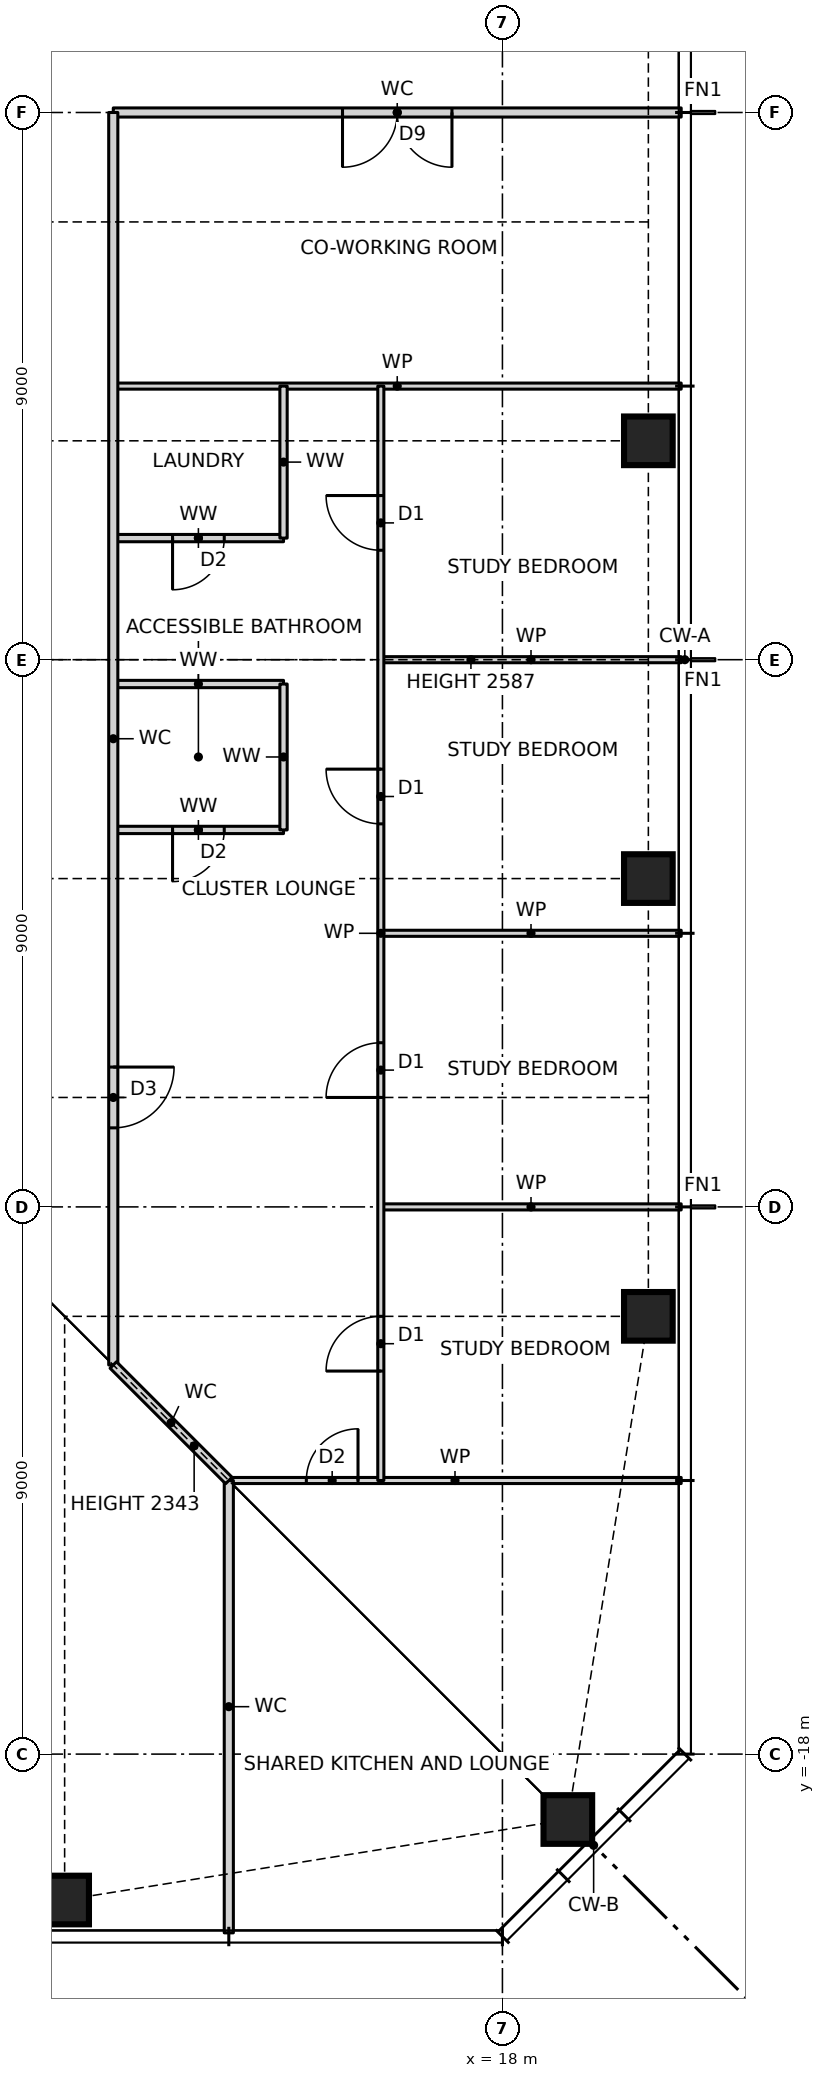
"""IFC4 building model, lengths in metres.
Left out: names, types, materials, properties, quantities, classifications, styles, units other than length and angle.
Written with IfcOpenShell. Run it as: python <this file> out.ifc"""

import sys

from ifc_helpers import new_model, si_unit, direction, frame, frame_2d, origin, origin_2d, place, context, subcontext, project, spatial, rectangle, hollow_rectangle, extrude, element, fill, save


model = new_model("IFC4")
c1 = context("Model", 3, precision=1e-05, world=origin(), true_north=direction((0.0, 1.0)))
c2 = subcontext(c1, "Body", "Model", "MODEL_VIEW")
j1 = project(units=[si_unit("LENGTHUNIT", "METRE"), si_unit("PLANEANGLEUNIT", "RADIAN")], contexts=[c1])
p1 = place(None, origin())
s1 = spatial("IfcSite", under=j1, at=p1, CompositionType="ELEMENT")
p2 = place(p1, origin())
s2 = spatial("IfcBuilding", under=s1, at=p2, CompositionType="ELEMENT")
p3 = place(p2, frame((0.0, 0.0, 122.5)))
s3 = spatial("IfcBuildingStorey", under=s2, at=p3, CompositionType="ELEMENT", Elevation=122.5)
for number, where, z_axis, x_axis in (
    (1, (10.8, -20.4, 0.0), (0.0, 0.0, 1.0), (1.0, 0.0, 0.0)),
    (2, (19.076, -19.076, 0.0), (0.0, 0.0, 1.0), (1.0, 0.0, 0.0)),
    (3, (20.4, -10.8, 0.0), (0.0, 0.0, 1.0), (1.0, 0.0, 0.0)),
    (4, (20.4, -3.6, 0.0), (0.0, 0.0, 1.0), (1.0, 0.0, 0.0)),
    (5, (20.4, 3.6, 0.0), (0.0, 0.0, 1.0), (1.0, 0.0, 0.0)),
):
    element("IfcColumn", number, at=place(p3, frame(where, z_axis=z_axis, x_axis=x_axis)), inside=s3, PredefinedType="COLUMN", context=c2, shape_type="SweptSolid", body=[
        extrude(hollow_rectangle(XDim=0.8, YDim=0.8, WallThickness=0.07, at=origin_2d()), origin(), (0.0, 0.0, 1.0), 3.5),
    ])
p4 = place(p3, frame((13.5, -13.5, 0.0), z_axis=(0.0, 0.0, 1.0), x_axis=(1.0, 0.0, 0.0)))
e6 = element("IfcWall", 6, at=p4, inside=s3, PredefinedType="PARTITIONING", context=c2, shape_type="SweptSolid", body=[
    extrude(rectangle(XDim=7.44, YDim=0.1, at=frame_2d((3.72, 0.0))), origin(), (0.0, 0.0, 1.0), 3.27),
])
p5 = place(p4, frame((1.275, 0.0, 0.0)))
e7 = element("IfcOpeningElement", 7, at=p5, cuts=e6, PredefinedType="OPENING", context=c2, shape_type="SweptSolid", body=[
    extrude(rectangle(XDim=0.85, YDim=2.1, at=frame_2d((0.425, 1.05))), frame((0.0, 0.06, 0.0), z_axis=(0.0, -1.0, 0.0), x_axis=(1.0, 0.0, 0.0)), (0.0, 0.0, 1.0), 0.12),
])
for number, where, z_axis, x_axis in (
    (8, (16.0, -9.0, 0.0), (0.0, 0.0, 1.0), (1.0, 0.0, 0.0)),
    (9, (16.0, -4.5, 0.0), (0.0, 0.0, 1.0), (1.0, 0.0, 0.0)),
):
    element("IfcWall", number, at=place(p3, frame(where, z_axis=z_axis, x_axis=x_axis)), inside=s3, PredefinedType="PARTITIONING", context=c2, shape_type="SweptSolid", body=[
        extrude(rectangle(XDim=4.94, YDim=0.1, at=frame_2d((2.47, 0.0))), origin(), (0.0, 0.0, 1.0), 3.27),
    ])
p6 = place(p3, frame((11.6, -2.8, 0.0), z_axis=(0.0, 0.0, 1.0), x_axis=(1.0, 0.0, 0.0)))
e10 = element("IfcWall", 10, at=p6, inside=s3, PredefinedType="PARTITIONING", context=c2, shape_type="SweptSolid", body=[
    extrude(rectangle(XDim=2.8, YDim=0.12, at=frame_2d((1.4, 0.0))), origin(), (0.0, 0.0, 1.0), 3.27),
])
p7 = place(p6, frame((0.975, 0.0, 0.0)))
e11 = element("IfcOpeningElement", 11, at=p7, cuts=e10, PredefinedType="OPENING", context=c2, shape_type="SweptSolid", body=[
    extrude(rectangle(XDim=0.85, YDim=2.1, at=frame_2d((0.425, 1.05))), frame((0.0, 0.07, 0.0), z_axis=(0.0, -1.0, 0.0), x_axis=(1.0, 0.0, 0.0)), (0.0, 0.0, 1.0), 0.14),
])
p8 = place(p3, frame((11.6, -0.4, 0.0), z_axis=(0.0, 0.0, 1.0), x_axis=(1.0, 0.0, 0.0)))
e12 = element("IfcWall", 12, at=p8, inside=s3, PredefinedType="PARTITIONING", context=c2, shape_type="SweptSolid", body=[
    extrude(rectangle(XDim=2.8, YDim=0.12, at=frame_2d((1.4, 0.0))), origin(), (0.0, 0.0, 1.0), 3.27),
])
p9 = place(p3, frame((16.0, 0.0, 0.0), z_axis=(0.0, 0.0, 1.0), x_axis=(1.0, 0.0, 0.0)))
e13 = element("IfcWall", 13, at=p9, inside=s3, PredefinedType="PARTITIONING", context=c2, shape_type="SweptSolid", body=[
    extrude(rectangle(XDim=4.94, YDim=0.1, at=frame_2d((2.47, 0.0))), origin(), (0.0, 0.0, 1.0), 2.587),
])
p10 = place(p3, frame((11.6, 2.0, 0.0), z_axis=(0.0, 0.0, 1.0), x_axis=(1.0, 0.0, 0.0)))
e14 = element("IfcWall", 14, at=p10, inside=s3, PredefinedType="PARTITIONING", context=c2, shape_type="SweptSolid", body=[
    extrude(rectangle(XDim=2.8, YDim=0.12, at=frame_2d((1.4, 0.0))), origin(), (0.0, 0.0, 1.0), 3.27),
])
p11 = place(p10, frame((0.975, 0.0, 0.0)))
e15 = element("IfcOpeningElement", 15, at=p11, cuts=e14, PredefinedType="OPENING", context=c2, shape_type="SweptSolid", body=[
    extrude(rectangle(XDim=0.85, YDim=2.1, at=frame_2d((0.425, 1.05))), frame((0.0, 0.07, 0.0), z_axis=(0.0, -1.0, 0.0), x_axis=(1.0, 0.0, 0.0)), (0.0, 0.0, 1.0), 0.14),
])
p12 = place(p3, frame((11.6, 4.5, 0.0), z_axis=(0.0, 0.0, 1.0), x_axis=(1.0, 0.0, 0.0)))
e16 = element("IfcWall", 16, at=p12, inside=s3, PredefinedType="PARTITIONING", context=c2, shape_type="SweptSolid", body=[
    extrude(rectangle(XDim=9.34, YDim=0.1, at=frame_2d((4.67, 0.0))), origin(), (0.0, 0.0, 1.0), 3.27),
])
p13 = place(p3, frame((11.6, 9.0, 0.0), z_axis=(0.0, 0.0, 1.0), x_axis=(1.0, 0.0, 0.0)))
e17 = element("IfcWall", 17, at=p13, inside=s3, PredefinedType="PARTITIONING", context=c2, shape_type="SweptSolid", body=[
    extrude(rectangle(XDim=9.34, YDim=0.15, at=frame_2d((4.67, 0.0))), origin(), (0.0, 0.0, 1.0), 3.27),
])
p14 = place(p13, frame((3.77, 0.0, 0.0)))
e18 = element("IfcOpeningElement", 18, at=p14, cuts=e17, PredefinedType="OPENING", context=c2, shape_type="SweptSolid", body=[
    extrude(rectangle(XDim=1.8, YDim=2.1, at=frame_2d((0.9, 1.05))), frame((0.0, 0.085, 0.0), z_axis=(0.0, -1.0, 0.0), x_axis=(1.0, 0.0, 0.0)), (0.0, 0.0, 1.0), 0.17),
])
p15 = place(p3, frame((16.0, -13.5, 0.0), z_axis=(0.0, 0.0, 1.0), x_axis=(0.0, 1.0, 0.0)))
e19 = element("IfcWall", 19, at=p15, inside=s3, PredefinedType="PARTITIONING", context=c2, shape_type="SweptSolid", body=[
    extrude(rectangle(XDim=18.0, YDim=0.1, at=frame_2d((9.0, 0.0))), origin(), (0.0, 0.0, 1.0), 3.27),
])
p16 = place(p15, frame((1.8, 0.0, 0.0)))
e20 = element("IfcOpeningElement", 20, at=p16, cuts=e19, PredefinedType="OPENING", context=c2, shape_type="SweptSolid", body=[
    extrude(rectangle(XDim=0.9, YDim=2.1, at=frame_2d((0.45, 1.05))), frame((0.0, 0.06, 0.0), z_axis=(0.0, -1.0, 0.0), x_axis=(1.0, 0.0, 0.0)), (0.0, 0.0, 1.0), 0.12),
])
p17 = place(p15, frame((6.3, 0.0, 0.0)))
e21 = element("IfcOpeningElement", 21, at=p17, cuts=e19, PredefinedType="OPENING", context=c2, shape_type="SweptSolid", body=[
    extrude(rectangle(XDim=0.9, YDim=2.1, at=frame_2d((0.45, 1.05))), frame((0.0, 0.06, 0.0), z_axis=(0.0, -1.0, 0.0), x_axis=(1.0, 0.0, 0.0)), (0.0, 0.0, 1.0), 0.12),
])
p18 = place(p15, frame((10.8, 0.0, 0.0)))
e22 = element("IfcOpeningElement", 22, at=p18, cuts=e19, PredefinedType="OPENING", context=c2, shape_type="SweptSolid", body=[
    extrude(rectangle(XDim=0.9, YDim=2.1, at=frame_2d((0.45, 1.05))), frame((0.0, 0.06, 0.0), z_axis=(0.0, -1.0, 0.0), x_axis=(1.0, 0.0, 0.0)), (0.0, 0.0, 1.0), 0.12),
])
p19 = place(p15, frame((15.3, 0.0, 0.0)))
e23 = element("IfcOpeningElement", 23, at=p19, cuts=e19, PredefinedType="OPENING", context=c2, shape_type="SweptSolid", body=[
    extrude(rectangle(XDim=0.9, YDim=2.1, at=frame_2d((0.45, 1.05))), frame((0.0, 0.06, 0.0), z_axis=(0.0, -1.0, 0.0), x_axis=(1.0, 0.0, 0.0)), (0.0, 0.0, 1.0), 0.12),
])
p20 = place(p3, frame((14.4, -2.8, 0.0), z_axis=(0.0, 0.0, 1.0), x_axis=(0.0, 1.0, 0.0)))
e24 = element("IfcWall", 24, at=p20, inside=s3, PredefinedType="PARTITIONING", context=c2, shape_type="SweptSolid", body=[
    extrude(rectangle(XDim=2.4, YDim=0.12, at=frame_2d((1.2, 0.0))), origin(), (0.0, 0.0, 1.0), 3.27),
])
p21 = place(p3, frame((14.4, 2.0, 0.0), z_axis=(0.0, 0.0, 1.0), x_axis=(0.0, 1.0, 0.0)))
e25 = element("IfcWall", 25, at=p21, inside=s3, PredefinedType="PARTITIONING", context=c2, shape_type="SweptSolid", body=[
    extrude(rectangle(XDim=2.5, YDim=0.12, at=frame_2d((1.25, 0.0))), origin(), (0.0, 0.0, 1.0), 3.27),
])
p22 = place(p3, frame((13.5, -20.94, 0.0), z_axis=(0.0, 0.0, 1.0), x_axis=(0.0, 1.0, 0.0)))
e26 = element("IfcWall", 26, at=p22, inside=s3, PredefinedType="PARTITIONING", context=c2, shape_type="SweptSolid", body=[
    extrude(rectangle(XDim=7.44, YDim=0.15, at=frame_2d((3.72, 0.0))), origin(), (0.0, 0.0, 1.0), 3.27),
])
p23 = place(p3, frame((11.6, -11.6, 0.0), z_axis=(0.0, 0.0, 1.0), x_axis=(0.0, 1.0, 0.0)))
e27 = element("IfcWall", 27, at=p23, inside=s3, PredefinedType="PARTITIONING", context=c2, shape_type="SweptSolid", body=[
    extrude(rectangle(XDim=20.6, YDim=0.15, at=frame_2d((10.3, 0.0))), origin(), (0.0, 0.0, 1.0), 3.27),
])
p24 = place(p23, frame((3.9, 0.0, 0.0)))
e28 = element("IfcOpeningElement", 28, at=p24, cuts=e27, PredefinedType="OPENING", context=c2, shape_type="SweptSolid", body=[
    extrude(rectangle(XDim=1.0, YDim=2.1, at=frame_2d((0.5, 1.05))), frame((0.0, 0.085, 0.0), z_axis=(0.0, -1.0, 0.0), x_axis=(1.0, 0.0, 0.0)), (0.0, 0.0, 1.0), 0.17),
])
p25 = place(p3, frame((13.5, -13.5, 0.0), z_axis=(0.0, 0.0, 1.0), x_axis=(-0.707106781187, 0.707106781187, 0.0)))
e29 = element("IfcWall", 29, at=p25, inside=s3, PredefinedType="PARTITIONING", context=c2, shape_type="SweptSolid", body=[
    extrude(rectangle(XDim=2.687, YDim=0.15, at=frame_2d((1.343, 0.0))), origin(), (0.0, 0.0, 1.0), 2.343),
])
p26 = place(p16, origin())
e30 = element("IfcDoor", 30, at=p26, inside=s3, OperationType="SINGLE_SWING_LEFT", PredefinedType="DOOR", context=c2, shape_type="SweptSolid", body=[
    extrude(rectangle(XDim=0.9, YDim=2.1, at=frame_2d((0.45, 1.05))), frame((0.0, 0.025, 0.0), z_axis=(0.0, -1.0, 0.0), x_axis=(1.0, 0.0, 0.0)), (0.0, 0.0, 1.0), 0.05),
])
fill(e20, e30)
p27 = place(p17, origin())
e31 = element("IfcDoor", 31, at=p27, inside=s3, OperationType="SINGLE_SWING_LEFT", PredefinedType="DOOR", context=c2, shape_type="SweptSolid", body=[
    extrude(rectangle(XDim=0.9, YDim=2.1, at=frame_2d((0.45, 1.05))), frame((0.0, 0.025, 0.0), z_axis=(0.0, -1.0, 0.0), x_axis=(1.0, 0.0, 0.0)), (0.0, 0.0, 1.0), 0.05),
])
fill(e21, e31)
p28 = place(p18, origin())
e32 = element("IfcDoor", 32, at=p28, inside=s3, OperationType="SINGLE_SWING_RIGHT", PredefinedType="DOOR", context=c2, shape_type="SweptSolid", body=[
    extrude(rectangle(XDim=0.9, YDim=2.1, at=frame_2d((0.45, 1.05))), frame((0.0, 0.025, 0.0), z_axis=(0.0, -1.0, 0.0), x_axis=(1.0, 0.0, 0.0)), (0.0, 0.0, 1.0), 0.05),
])
fill(e22, e32)
p29 = place(p19, origin())
e33 = element("IfcDoor", 33, at=p29, inside=s3, OperationType="SINGLE_SWING_RIGHT", PredefinedType="DOOR", context=c2, shape_type="SweptSolid", body=[
    extrude(rectangle(XDim=0.9, YDim=2.1, at=frame_2d((0.45, 1.05))), frame((0.0, 0.025, 0.0), z_axis=(0.0, -1.0, 0.0), x_axis=(1.0, 0.0, 0.0)), (0.0, 0.0, 1.0), 0.05),
])
fill(e23, e33)
p30 = place(p24, frame((1.0, 0.0, 0.0), z_axis=(0.0, 0.0, 1.0), x_axis=(-1.0, 0.0, 0.0)))
e34 = element("IfcDoor", 34, at=p30, inside=s3, OperationType="SINGLE_SWING_LEFT", PredefinedType="DOOR", context=c2, shape_type="SweptSolid", body=[
    extrude(rectangle(XDim=1.0, YDim=2.1, at=frame_2d((0.5, 1.05))), frame((0.0, 0.025, 0.0), z_axis=(0.0, -1.0, 0.0), x_axis=(1.0, 0.0, 0.0)), (0.0, 0.0, 1.0), 0.05),
])
fill(e28, e34)
p31 = place(p7, frame((0.85, 0.0, 0.0), z_axis=(0.0, 0.0, 1.0), x_axis=(-1.0, 0.0, 0.0)))
e35 = element("IfcDoor", 35, at=p31, inside=s3, OperationType="SINGLE_SWING_RIGHT", PredefinedType="DOOR", context=c2, shape_type="SweptSolid", body=[
    extrude(rectangle(XDim=0.85, YDim=2.1, at=frame_2d((0.425, 1.05))), frame((0.0, 0.025, 0.0), z_axis=(0.0, -1.0, 0.0), x_axis=(1.0, 0.0, 0.0)), (0.0, 0.0, 1.0), 0.05),
])
fill(e11, e35)
p32 = place(p11, frame((0.85, 0.0, 0.0), z_axis=(0.0, 0.0, 1.0), x_axis=(-1.0, 0.0, 0.0)))
e36 = element("IfcDoor", 36, at=p32, inside=s3, OperationType="SINGLE_SWING_RIGHT", PredefinedType="DOOR", context=c2, shape_type="SweptSolid", body=[
    extrude(rectangle(XDim=0.85, YDim=2.1, at=frame_2d((0.425, 1.05))), frame((0.0, 0.025, 0.0), z_axis=(0.0, -1.0, 0.0), x_axis=(1.0, 0.0, 0.0)), (0.0, 0.0, 1.0), 0.05),
])
fill(e15, e36)
p33 = place(p14, frame((1.8, 0.0, 0.0), z_axis=(0.0, 0.0, 1.0), x_axis=(-1.0, 0.0, 0.0)))
e37 = element("IfcDoor", 37, at=p33, inside=s3, OperationType="DOUBLE_DOOR_SINGLE_SWING", PredefinedType="DOOR", context=c2, shape_type="SweptSolid", body=[
    extrude(rectangle(XDim=1.8, YDim=2.1, at=frame_2d((0.9, 1.05))), frame((0.0, 0.025, 0.0), z_axis=(0.0, -1.0, 0.0), x_axis=(1.0, 0.0, 0.0)), (0.0, 0.0, 1.0), 0.05),
])
fill(e18, e37)
p34 = place(p5, origin())
e38 = element("IfcDoor", 38, at=p34, inside=s3, OperationType="SINGLE_SWING_RIGHT", PredefinedType="DOOR", context=c2, shape_type="SweptSolid", body=[
    extrude(rectangle(XDim=0.85, YDim=2.1, at=frame_2d((0.425, 1.05))), frame((0.0, 0.025, 0.0), z_axis=(0.0, -1.0, 0.0), x_axis=(1.0, 0.0, 0.0)), (0.0, 0.0, 1.0), 0.05),
])
fill(e7, e38)
save(model, sys.argv[1])
